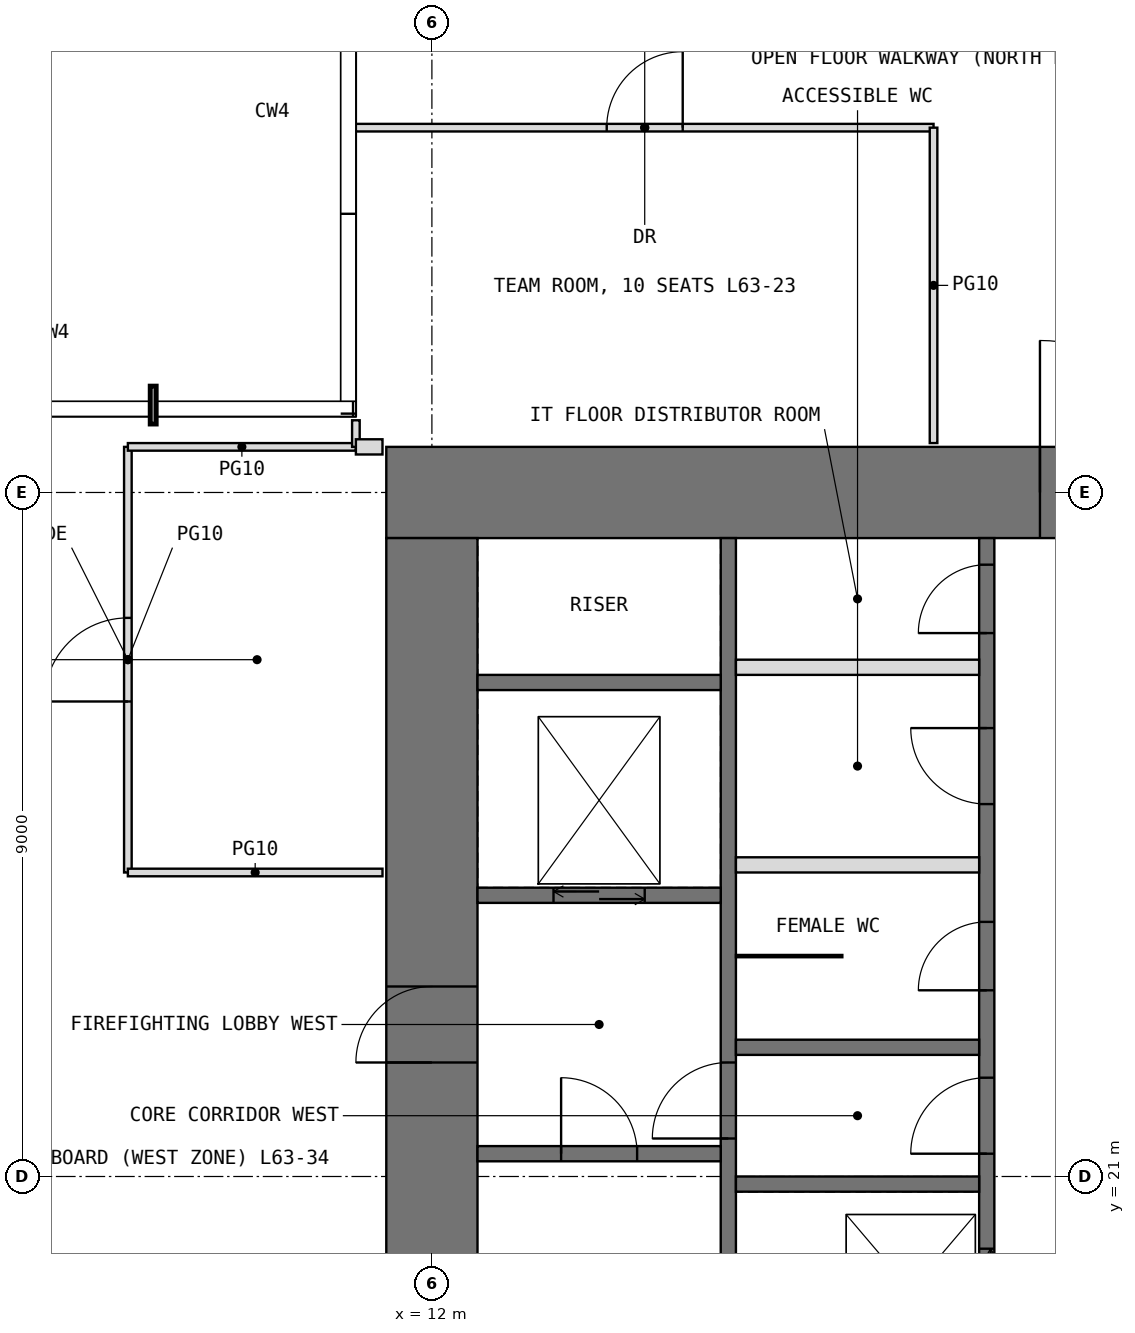
"""IFC4 building model, lengths in metres.
Left out: names, types, materials, properties, quantities, classifications, styles, units other than length and angle.
Written with IfcOpenShell. Run it as: python <this file> out.ifc"""

import sys

from ifc_helpers import new_model, si_unit, direction, frame, frame_2d, origin, place, context, subcontext, project, spatial, rectangle, extrude, element, fill, save


model = new_model("IFC4")
c1 = context("Model", 3, precision=1e-05, world=origin(), true_north=direction((0.0, 1.0)))
c2 = subcontext(c1, "Body", "Model", "MODEL_VIEW")
j1 = project(units=[si_unit("LENGTHUNIT", "METRE"), si_unit("PLANEANGLEUNIT", "RADIAN")], contexts=[c1])
p1 = place(None, origin())
s1 = spatial("IfcSite", under=j1, at=p1, CompositionType="ELEMENT")
p2 = place(p1, origin())
s2 = spatial("IfcBuilding", under=s1, at=p2, CompositionType="ELEMENT")
p3 = place(p2, frame((0.0, 0.0, 265.0)))
s3 = spatial("IfcBuildingStorey", under=s2, at=p3, CompositionType="ELEMENT", Elevation=265.0)
p4 = place(p3, frame((11.4, 30.0, -0.05), z_axis=(0.0, 0.0, 1.0), x_axis=(1.0, 0.0, 0.0)))
e1 = element("IfcWall", 1, at=p4, inside=s3, PredefinedType="SHEAR", context=c2, shape_type="SweptSolid", body=[
    extrude(rectangle(XDim=19.2, YDim=1.2, at=frame_2d((9.6, 0.0))), origin(), (0.0, 0.0, 1.0), 4.2),
])
p5 = place(p4, frame((8.6, 0.0, 0.05)))
e2 = element("IfcOpeningElement", 2, at=p5, cuts=e1, PredefinedType="OPENING", context=c2, shape_type="SweptSolid", body=[
    extrude(rectangle(XDim=2.0, YDim=2.2, at=frame_2d((1.0, 1.1))), frame((0.0, 0.61, 0.0), z_axis=(0.0, -1.0, 0.0), x_axis=(1.0, 0.0, 0.0)), (0.0, 0.0, 1.0), 1.22),
])
p6 = place(p3, frame((12.0, 12.6, -0.05), z_axis=(0.0, 0.0, 1.0), x_axis=(0.0, 1.0, 0.0)))
e3 = element("IfcWall", 3, at=p6, inside=s3, PredefinedType="SHEAR", context=c2, shape_type="SweptSolid", body=[
    extrude(rectangle(XDim=16.8, YDim=1.2, at=frame_2d((8.4, 0.0))), origin(), (0.0, 0.0, 1.0), 4.2),
])
p7 = place(p6, frame((9.9, 0.0, 0.05)))
e4 = element("IfcOpeningElement", 4, at=p7, cuts=e3, PredefinedType="OPENING", context=c2, shape_type="SweptSolid", body=[
    extrude(rectangle(XDim=1.0, YDim=2.2, at=frame_2d((0.5, 1.1))), frame((0.0, 0.61, 0.0), z_axis=(0.0, -1.0, 0.0), x_axis=(1.0, 0.0, 0.0)), (0.0, 0.0, 1.0), 1.22),
])
p8 = place(p3, frame((15.9, 12.6, -0.05), z_axis=(0.0, 0.0, 1.0), x_axis=(0.0, 1.0, 0.0)))
e5 = element("IfcWall", 5, at=p8, inside=s3, PredefinedType="SHEAR", context=c2, shape_type="SweptSolid", body=[
    extrude(rectangle(XDim=16.8, YDim=0.2, at=frame_2d((8.4, 0.0))), origin(), (0.0, 0.0, 1.0), 4.2),
])
p9 = place(p8, frame((8.9, 0.0, 0.05)))
e6 = element("IfcOpeningElement", 6, at=p9, cuts=e5, PredefinedType="OPENING", context=c2, shape_type="SweptSolid", body=[
    extrude(rectangle(XDim=1.0, YDim=2.2, at=frame_2d((0.5, 1.1))), frame((0.0, 0.11, 0.0), z_axis=(0.0, -1.0, 0.0), x_axis=(1.0, 0.0, 0.0)), (0.0, 0.0, 1.0), 0.22),
])
p10 = place(p3, frame((19.3, 12.6, -0.05), z_axis=(0.0, 0.0, 1.0), x_axis=(0.0, 1.0, 0.0)))
e7 = element("IfcWall", 7, at=p10, inside=s3, PredefinedType="SHEAR", context=c2, shape_type="SweptSolid", body=[
    extrude(rectangle(XDim=16.8, YDim=0.2, at=frame_2d((8.4, 0.0))), origin(), (0.0, 0.0, 1.0), 4.2),
])
p11 = place(p10, frame((8.7, 0.0, 0.05)))
e8 = element("IfcOpeningElement", 8, at=p11, cuts=e7, PredefinedType="OPENING", context=c2, shape_type="SweptSolid", body=[
    extrude(rectangle(XDim=1.0, YDim=2.2, at=frame_2d((0.5, 1.1))), frame((0.0, 0.11, 0.0), z_axis=(0.0, -1.0, 0.0), x_axis=(1.0, 0.0, 0.0)), (0.0, 0.0, 1.0), 0.22),
])
p12 = place(p10, frame((10.85, 0.0, 0.05)))
e9 = element("IfcOpeningElement", 9, at=p12, cuts=e7, PredefinedType="OPENING", context=c2, shape_type="SweptSolid", body=[
    extrude(rectangle(XDim=0.9, YDim=2.2, at=frame_2d((0.45, 1.1))), frame((0.0, 0.11, 0.0), z_axis=(0.0, -1.0, 0.0), x_axis=(1.0, 0.0, 0.0)), (0.0, 0.0, 1.0), 0.22),
])
p13 = place(p10, frame((13.3, 0.0, 0.05)))
e10 = element("IfcOpeningElement", 10, at=p13, cuts=e7, PredefinedType="OPENING", context=c2, shape_type="SweptSolid", body=[
    extrude(rectangle(XDim=1.0, YDim=2.2, at=frame_2d((0.5, 1.1))), frame((0.0, 0.11, 0.0), z_axis=(0.0, -1.0, 0.0), x_axis=(1.0, 0.0, 0.0)), (0.0, 0.0, 1.0), 0.22),
])
p14 = place(p10, frame((15.55, 0.0, 0.05)))
e11 = element("IfcOpeningElement", 11, at=p14, cuts=e7, PredefinedType="OPENING", context=c2, shape_type="SweptSolid", body=[
    extrude(rectangle(XDim=0.9, YDim=2.2, at=frame_2d((0.45, 1.1))), frame((0.0, 0.11, 0.0), z_axis=(0.0, -1.0, 0.0), x_axis=(1.0, 0.0, 0.0)), (0.0, 0.0, 1.0), 0.22),
])
p15 = place(p10, frame((0.75, 0.0, 0.05)))
e12 = element("IfcOpeningElement", 12, at=p15, cuts=e7, PredefinedType="OPENING", context=c2, shape_type="SweptSolid", body=[
    extrude(rectangle(XDim=1.1, YDim=2.2, at=frame_2d((0.55, 1.1))), frame((0.0, 0.11, 0.0), z_axis=(0.0, -1.0, 0.0), x_axis=(1.0, 0.0, 0.0)), (0.0, 0.0, 1.0), 0.22),
])
p16 = place(p10, frame((3.55, 0.0, 0.05)))
e13 = element("IfcOpeningElement", 13, at=p16, cuts=e7, PredefinedType="OPENING", context=c2, shape_type="SweptSolid", body=[
    extrude(rectangle(XDim=1.1, YDim=2.2, at=frame_2d((0.55, 1.1))), frame((0.0, 0.11, 0.0), z_axis=(0.0, -1.0, 0.0), x_axis=(1.0, 0.0, 0.0)), (0.0, 0.0, 1.0), 0.22),
])
p17 = place(p10, frame((6.35, 0.0, 0.05)))
e14 = element("IfcOpeningElement", 14, at=p17, cuts=e7, PredefinedType="OPENING", context=c2, shape_type="SweptSolid", body=[
    extrude(rectangle(XDim=1.1, YDim=2.2, at=frame_2d((0.55, 1.1))), frame((0.0, 0.11, 0.0), z_axis=(0.0, -1.0, 0.0), x_axis=(1.0, 0.0, 0.0)), (0.0, 0.0, 1.0), 0.22),
])
p18 = place(p3, frame((12.6, 21.3, -0.05), z_axis=(0.0, 0.0, 1.0), x_axis=(1.0, 0.0, 0.0)))
e15 = element("IfcWall", 15, at=p18, inside=s3, PredefinedType="SHEAR", context=c2, shape_type="SweptSolid", body=[
    extrude(rectangle(XDim=3.2, YDim=0.2, at=frame_2d((1.6, 0.0))), origin(), (0.0, 0.0, 1.0), 4.2),
])
p19 = place(p18, frame((1.1, 0.0, 0.05)))
e16 = element("IfcOpeningElement", 16, at=p19, cuts=e15, PredefinedType="OPENING", context=c2, shape_type="SweptSolid", body=[
    extrude(rectangle(XDim=1.0, YDim=2.2, at=frame_2d((0.5, 1.1))), frame((0.0, 0.11, 0.0), z_axis=(0.0, -1.0, 0.0), x_axis=(1.0, 0.0, 0.0)), (0.0, 0.0, 1.0), 0.22),
])
p20 = place(p3, frame((12.6, 24.7, -0.05), z_axis=(0.0, 0.0, 1.0), x_axis=(1.0, 0.0, 0.0)))
e17 = element("IfcWall", 17, at=p20, inside=s3, PredefinedType="SHEAR", context=c2, shape_type="SweptSolid", body=[
    extrude(rectangle(XDim=3.2, YDim=0.2, at=frame_2d((1.6, 0.0))), origin(), (0.0, 0.0, 1.0), 4.2),
])
p21 = place(p20, frame((1.0, 0.0, 0.05)))
e18 = element("IfcOpeningElement", 18, at=p21, cuts=e17, PredefinedType="OPENING", context=c2, shape_type="SweptSolid", body=[
    extrude(rectangle(XDim=1.2, YDim=2.2, at=frame_2d((0.6, 1.1))), frame((0.0, 0.11, 0.0), z_axis=(0.0, -1.0, 0.0), x_axis=(1.0, 0.0, 0.0)), (0.0, 0.0, 1.0), 0.22),
])
for number, where, z_axis, x_axis in (
    (19, (12.6, 27.5, -0.05), (0.0, 0.0, 1.0), (1.0, 0.0, 0.0)),
    (20, (16.0, 20.9, -0.05), (0.0, 0.0, 1.0), (1.0, 0.0, 0.0)),
    (21, (16.0, 22.7, -0.05), (0.0, 0.0, 1.0), (1.0, 0.0, 0.0)),
):
    element("IfcWall", number, at=place(p3, frame(where, z_axis=z_axis, x_axis=x_axis)), inside=s3, PredefinedType="SHEAR", context=c2, shape_type="SweptSolid", body=[
        extrude(rectangle(XDim=3.2, YDim=0.2, at=frame_2d((1.6, 0.0))), origin(), (0.0, 0.0, 1.0), 4.2),
    ])
for number, where, z_axis, x_axis in (
    (22, (16.0, 25.1, 0.0), (0.0, 0.0, 1.0), (1.0, 0.0, 0.0)),
    (23, (16.0, 27.7, 0.0), (0.0, 0.0, 1.0), (1.0, 0.0, 0.0)),
):
    element("IfcWall", number, at=place(p3, frame(where, z_axis=z_axis, x_axis=x_axis)), inside=s3, PredefinedType="PARTITIONING", context=c2, shape_type="SweptSolid", body=[
        extrude(rectangle(XDim=3.2, YDim=0.2, at=frame_2d((1.6, 0.0))), origin(), (0.0, 0.0, 1.0), 3.95),
    ])
p22 = place(p3, frame((16.0, 23.9, 0.0), z_axis=(0.0, 0.0, 1.0), x_axis=(1.0, 0.0, 0.0)))
e24 = element("IfcWall", 24, at=p22, inside=s3, PredefinedType="PARTITIONING", context=c2, shape_type="SweptSolid", body=[
    extrude(rectangle(XDim=1.4, YDim=0.03, at=frame_2d((0.7, 0.0))), origin(), (0.0, 0.0, 1.0), 3.95),
])
p23 = place(p3, frame((8.0, 25.0, 0.0), z_axis=(0.0, 0.0, 1.0), x_axis=(0.0, 1.0, 0.0)))
e25 = element("IfcWall", 25, at=p23, inside=s3, PredefinedType="PARTITIONING", context=c2, shape_type="SweptSolid", body=[
    extrude(rectangle(XDim=5.6, YDim=0.1, at=frame_2d((2.8, 0.0))), origin(), (0.0, 0.0, 1.0), 3.95),
])
p24 = place(p23, frame((2.25, 0.0, 0.0)))
e26 = element("IfcOpeningElement", 26, at=p24, cuts=e25, PredefinedType="OPENING", context=c2, shape_type="SweptSolid", body=[
    extrude(rectangle(XDim=1.1, YDim=2.3, at=frame_2d((0.55, 1.15))), frame((0.0, 0.06, 0.0), z_axis=(0.0, -1.0, 0.0), x_axis=(1.0, 0.0, 0.0)), (0.0, 0.0, 1.0), 0.12),
])
p25 = place(p3, frame((8.0, 25.0, 0.0), z_axis=(0.0, 0.0, 1.0), x_axis=(1.0, 0.0, 0.0)))
e27 = element("IfcWall", 27, at=p25, inside=s3, PredefinedType="PARTITIONING", context=c2, shape_type="SweptSolid", body=[
    extrude(rectangle(XDim=3.35, YDim=0.1, at=frame_2d((1.675, 0.0))), origin(), (0.0, 0.0, 1.0), 3.95),
])
p26 = place(p3, frame((8.0, 30.6, 0.0), z_axis=(0.0, 0.0, 1.0), x_axis=(1.0, 0.0, 0.0)))
e28 = element("IfcWall", 28, at=p26, inside=s3, PredefinedType="PARTITIONING", context=c2, shape_type="SweptSolid", body=[
    extrude(rectangle(XDim=3.0, YDim=0.1, at=frame_2d((1.5, 0.0))), origin(), (0.0, 0.0, 1.0), 3.95),
])
p27 = place(p3, frame((11.0, 30.6, 0.0), z_axis=(0.0, 0.0, 1.0), x_axis=(0.0, 1.0, 0.0)))
e29 = element("IfcWall", 29, at=p27, inside=s3, PredefinedType="PARTITIONING", context=c2, shape_type="SweptSolid", body=[
    extrude(rectangle(XDim=0.35, YDim=0.1, at=frame_2d((0.175, 0.0))), origin(), (0.0, 0.0, 1.0), 3.95),
])
p28 = place(p3, frame((11.0, 30.6, 0.0), z_axis=(0.0, 0.0, 1.0), x_axis=(1.0, 0.0, 0.0)))
e30 = element("IfcWall", 30, at=p28, inside=s3, PredefinedType="PARTITIONING", context=c2, shape_type="SweptSolid", body=[
    extrude(rectangle(XDim=0.35, YDim=0.2, at=frame_2d((0.175, 0.0))), origin(), (0.0, 0.0, 1.0), 3.95),
])
p29 = place(p3, frame((11.0, 34.8, 0.0), z_axis=(0.0, 0.0, 1.0), x_axis=(1.0, 0.0, 0.0)))
e31 = element("IfcWall", 31, at=p29, inside=s3, PredefinedType="PARTITIONING", context=c2, shape_type="SweptSolid", body=[
    extrude(rectangle(XDim=7.6, YDim=0.1, at=frame_2d((3.8, 0.0))), origin(), (0.0, 0.0, 1.0), 3.95),
])
p30 = place(p29, frame((3.3, 0.0, 0.0)))
e32 = element("IfcOpeningElement", 32, at=p30, cuts=e31, PredefinedType="OPENING", context=c2, shape_type="SweptSolid", body=[
    extrude(rectangle(XDim=1.0, YDim=2.2, at=frame_2d((0.5, 1.1))), frame((0.0, 0.06, 0.0), z_axis=(0.0, -1.0, 0.0), x_axis=(1.0, 0.0, 0.0)), (0.0, 0.0, 1.0), 0.12),
])
p31 = place(p3, frame((18.6, 30.65, 0.0), z_axis=(0.0, 0.0, 1.0), x_axis=(0.0, 1.0, 0.0)))
e33 = element("IfcWall", 33, at=p31, inside=s3, PredefinedType="PARTITIONING", context=c2, shape_type="SweptSolid", body=[
    extrude(rectangle(XDim=4.15, YDim=0.1, at=frame_2d((2.075, 0.0))), origin(), (0.0, 0.0, 1.0), 3.95),
])
p32 = place(p5, origin())
e34 = element("IfcDoor", 34, at=p32, inside=s3, OperationType="DOUBLE_DOOR_SINGLE_SWING", PredefinedType="DOOR", context=c2, shape_type="SweptSolid", body=[
    extrude(rectangle(XDim=2.0, YDim=2.2, at=frame_2d((1.0, 1.1))), frame((0.0, 0.025, 0.0), z_axis=(0.0, -1.0, 0.0), x_axis=(1.0, 0.0, 0.0)), (0.0, 0.0, 1.0), 0.05),
])
fill(e2, e34)
p33 = place(p7, origin())
e35 = element("IfcDoor", 35, at=p33, inside=s3, OperationType="SINGLE_SWING_LEFT", PredefinedType="DOOR", context=c2, shape_type="SweptSolid", body=[
    extrude(rectangle(XDim=1.0, YDim=2.2, at=frame_2d((0.5, 1.1))), frame((0.0, 0.025, 0.0), z_axis=(0.0, -1.0, 0.0), x_axis=(1.0, 0.0, 0.0)), (0.0, 0.0, 1.0), 0.05),
])
fill(e4, e35)
p34 = place(p19, origin())
e36 = element("IfcDoor", 36, at=p34, inside=s3, OperationType="SINGLE_SWING_LEFT", PredefinedType="DOOR", context=c2, shape_type="SweptSolid", body=[
    extrude(rectangle(XDim=1.0, YDim=2.2, at=frame_2d((0.5, 1.1))), frame((0.0, 0.025, 0.0), z_axis=(0.0, -1.0, 0.0), x_axis=(1.0, 0.0, 0.0)), (0.0, 0.0, 1.0), 0.05),
])
fill(e16, e36)
p35 = place(p9, origin())
e37 = element("IfcDoor", 37, at=p35, inside=s3, OperationType="SINGLE_SWING_LEFT", PredefinedType="DOOR", context=c2, shape_type="SweptSolid", body=[
    extrude(rectangle(XDim=1.0, YDim=2.2, at=frame_2d((0.5, 1.1))), frame((0.0, 0.025, 0.0), z_axis=(0.0, -1.0, 0.0), x_axis=(1.0, 0.0, 0.0)), (0.0, 0.0, 1.0), 0.05),
])
fill(e6, e37)
p36 = place(p11, origin())
e38 = element("IfcDoor", 38, at=p36, inside=s3, OperationType="SINGLE_SWING_LEFT", PredefinedType="DOOR", context=c2, shape_type="SweptSolid", body=[
    extrude(rectangle(XDim=1.0, YDim=2.2, at=frame_2d((0.5, 1.1))), frame((0.0, 0.025, 0.0), z_axis=(0.0, -1.0, 0.0), x_axis=(1.0, 0.0, 0.0)), (0.0, 0.0, 1.0), 0.05),
])
fill(e8, e38)
p37 = place(p12, origin())
e39 = element("IfcDoor", 39, at=p37, inside=s3, OperationType="SINGLE_SWING_LEFT", PredefinedType="DOOR", context=c2, shape_type="SweptSolid", body=[
    extrude(rectangle(XDim=0.9, YDim=2.2, at=frame_2d((0.45, 1.1))), frame((0.0, 0.025, 0.0), z_axis=(0.0, -1.0, 0.0), x_axis=(1.0, 0.0, 0.0)), (0.0, 0.0, 1.0), 0.05),
])
fill(e9, e39)
p38 = place(p13, origin())
e40 = element("IfcDoor", 40, at=p38, inside=s3, OperationType="SINGLE_SWING_RIGHT", PredefinedType="DOOR", context=c2, shape_type="SweptSolid", body=[
    extrude(rectangle(XDim=1.0, YDim=2.2, at=frame_2d((0.5, 1.1))), frame((0.0, 0.025, 0.0), z_axis=(0.0, -1.0, 0.0), x_axis=(1.0, 0.0, 0.0)), (0.0, 0.0, 1.0), 0.05),
])
fill(e10, e40)
p39 = place(p14, origin())
e41 = element("IfcDoor", 41, at=p39, inside=s3, OperationType="SINGLE_SWING_LEFT", PredefinedType="DOOR", context=c2, shape_type="SweptSolid", body=[
    extrude(rectangle(XDim=0.9, YDim=2.2, at=frame_2d((0.45, 1.1))), frame((0.0, 0.025, 0.0), z_axis=(0.0, -1.0, 0.0), x_axis=(1.0, 0.0, 0.0)), (0.0, 0.0, 1.0), 0.05),
])
fill(e11, e41)
p40 = place(p30, origin())
e42 = element("IfcDoor", 42, at=p40, inside=s3, OperationType="SINGLE_SWING_RIGHT", PredefinedType="DOOR", context=c2, shape_type="SweptSolid", body=[
    extrude(rectangle(XDim=1.0, YDim=2.2, at=frame_2d((0.5, 1.1))), frame((0.0, 0.025, 0.0), z_axis=(0.0, -1.0, 0.0), x_axis=(1.0, 0.0, 0.0)), (0.0, 0.0, 1.0), 0.05),
])
fill(e32, e42)
p41 = place(p24, origin())
e43 = element("IfcDoor", 43, at=p41, inside=s3, OperationType="SINGLE_SWING_LEFT", PredefinedType="DOOR", context=c2, shape_type="SweptSolid", body=[
    extrude(rectangle(XDim=1.1, YDim=2.3, at=frame_2d((0.55, 1.15))), frame((0.0, 0.025, 0.0), z_axis=(0.0, -1.0, 0.0), x_axis=(1.0, 0.0, 0.0)), (0.0, 0.0, 1.0), 0.05),
])
fill(e26, e43)
p42 = place(p17, origin())
e44 = element("IfcDoor", 44, at=p42, inside=s3, OperationType="DOUBLE_DOOR_SLIDING", PredefinedType="DOOR", context=c2, shape_type="SweptSolid", body=[
    extrude(rectangle(XDim=1.1, YDim=2.2, at=frame_2d((0.55, 1.1))), frame((0.0, 0.025, 0.0), z_axis=(0.0, -1.0, 0.0), x_axis=(1.0, 0.0, 0.0)), (0.0, 0.0, 1.0), 0.05),
])
fill(e14, e44)
p43 = place(p21, origin())
e45 = element("IfcDoor", 45, at=p43, inside=s3, OperationType="DOUBLE_DOOR_SLIDING", PredefinedType="DOOR", context=c2, shape_type="SweptSolid", body=[
    extrude(rectangle(XDim=1.2, YDim=2.2, at=frame_2d((0.6, 1.1))), frame((0.0, 0.025, 0.0), z_axis=(0.0, -1.0, 0.0), x_axis=(1.0, 0.0, 0.0)), (0.0, 0.0, 1.0), 0.05),
])
fill(e18, e45)
save(model, sys.argv[1])
